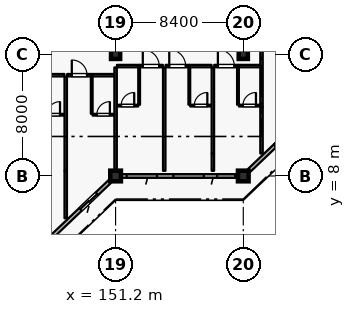
"""IFC4 building model, lengths in metres.
Left out: names, types, materials, properties, quantities, classifications, styles, units other than length and angle.
Written with IfcOpenShell. Run it as: python <this file> out.ifc"""

import sys

from ifc_helpers import new_model, si_unit, direction, frame, frame_2d, origin, origin_2d, place, context, subcontext, project, spatial, rectangle, extrude, element, fill, save


model = new_model("IFC4")
c1 = context("Model", 3, precision=1e-05, world=origin(), true_north=direction((0.0, 1.0)))
c2 = subcontext(c1, "Body", "Model", "MODEL_VIEW")
j1 = project(units=[si_unit("LENGTHUNIT", "METRE"), si_unit("PLANEANGLEUNIT", "RADIAN")], contexts=[c1])
p1 = place(None, origin())
s1 = spatial("IfcSite", under=j1, at=p1, CompositionType="ELEMENT")
p2 = place(p1, origin())
s2 = spatial("IfcBuilding", under=s1, at=p2, CompositionType="ELEMENT")
p3 = place(p2, frame((0.0, 0.0, 36.0)))
s3 = spatial("IfcBuildingStorey", under=s2, at=p3, CompositionType="ELEMENT", Elevation=36.0)
for number, where, z_axis, x_axis in (
    (1, (151.2, 8.0, 0.0), (0.0, 0.0, 1.0), (1.0, 0.0, 0.0)),
    (2, (159.6, 8.0, 0.0), (0.0, 0.0, 1.0), (1.0, 0.0, 0.0)),
):
    element("IfcColumn", number, at=place(p3, frame(where, z_axis=z_axis, x_axis=x_axis)), inside=s3, PredefinedType="COLUMN", context=c2, shape_type="SweptSolid", body=[
        extrude(rectangle(XDim=0.7, YDim=0.7, at=origin_2d()), origin(), (0.0, 0.0, 1.0), 3.6),
    ])
for number, where, z_axis, x_axis in (
    (3, (151.2, 16.0, 0.0), (0.0, 0.0, 1.0), (1.0, 0.0, 0.0)),
    (4, (159.6, 16.0, 0.0), (0.0, 0.0, 1.0), (1.0, 0.0, 0.0)),
):
    element("IfcColumn", number, at=place(p3, frame(where, z_axis=z_axis, x_axis=x_axis)), inside=s3, PredefinedType="COLUMN", context=c2, shape_type="SweptSolid", body=[
        extrude(rectangle(XDim=0.6, YDim=0.6, at=origin_2d()), origin(), (0.0, 0.0, 1.0), 3.6),
    ])
p4 = place(p3, frame((150.85, 7.667, 0.0), z_axis=(0.0, 0.0, 1.0), x_axis=(-0.724116091282, -0.689678103427, 0.0)))
e5 = element("IfcWall", 5, at=p4, inside=s3, PredefinedType="SOLIDWALL", context=c2, shape_type="SweptSolid", body=[
    extrude(rectangle(XDim=10.634, YDim=0.24, at=frame_2d((5.317, 0.0))), origin(), (0.0, 0.0, 1.0), 2.94),
])
p5 = place(p4, frame((1.204, 0.0, 0.0)))
e6 = element("IfcOpeningElement", 6, at=p5, cuts=e5, PredefinedType="OPENING", context=c2, shape_type="SweptSolid", body=[
    extrude(rectangle(XDim=1.5, YDim=2.25, at=frame_2d((0.75, 1.125))), frame((0.0, 0.13, 0.0), z_axis=(0.0, -1.0, 0.0), x_axis=(1.0, 0.0, 0.0)), (0.0, 0.0, 1.0), 0.26),
])
p6 = place(p4, frame((5.511, 0.0, 0.8)))
e7 = element("IfcOpeningElement", 7, at=p6, cuts=e5, PredefinedType="OPENING", context=c2, shape_type="SweptSolid", body=[
    extrude(rectangle(XDim=1.6, YDim=1.6, at=frame_2d((0.8, 0.8))), frame((0.0, 0.13, 0.0), z_axis=(0.0, -1.0, 0.0), x_axis=(1.0, 0.0, 0.0)), (0.0, 0.0, 1.0), 0.26),
])
p7 = place(p4, frame((8.874, 0.0, 0.8)))
e8 = element("IfcOpeningElement", 8, at=p7, cuts=e5, PredefinedType="OPENING", context=c2, shape_type="SweptSolid", body=[
    extrude(rectangle(XDim=1.6, YDim=1.6, at=frame_2d((0.8, 0.8))), frame((0.0, 0.13, 0.0), z_axis=(0.0, -1.0, 0.0), x_axis=(1.0, 0.0, 0.0)), (0.0, 0.0, 1.0), 0.26),
])
p8 = place(p3, frame((159.25, 8.0, 0.0), z_axis=(0.0, 0.0, 1.0), x_axis=(-1.0, 0.0, 0.0)))
e9 = element("IfcWall", 9, at=p8, inside=s3, PredefinedType="SOLIDWALL", context=c2, shape_type="SweptSolid", body=[
    extrude(rectangle(XDim=7.7, YDim=0.24, at=frame_2d((3.85, 0.0))), origin(), (0.0, 0.0, 1.0), 2.94),
])
p9 = place(p8, frame((0.175, 0.0, 0.8)))
e10 = element("IfcOpeningElement", 10, at=p9, cuts=e9, PredefinedType="OPENING", context=c2, shape_type="SweptSolid", body=[
    extrude(rectangle(XDim=1.2, YDim=1.5, at=frame_2d((0.6, 0.75))), frame((0.0, 0.13, 0.0), z_axis=(0.0, -1.0, 0.0), x_axis=(1.0, 0.0, 0.0)), (0.0, 0.0, 1.0), 0.26),
])
p10 = place(p8, frame((2.25, 0.0, 0.8)))
e11 = element("IfcOpeningElement", 11, at=p10, cuts=e9, PredefinedType="OPENING", context=c2, shape_type="SweptSolid", body=[
    extrude(rectangle(XDim=2.0, YDim=1.75, at=frame_2d((1.0, 0.875))), frame((0.0, 0.13, 0.0), z_axis=(0.0, -1.0, 0.0), x_axis=(1.0, 0.0, 0.0)), (0.0, 0.0, 1.0), 0.26),
])
p11 = place(p8, frame((5.325, 0.0, 0.8)))
e12 = element("IfcOpeningElement", 12, at=p11, cuts=e9, PredefinedType="OPENING", context=c2, shape_type="SweptSolid", body=[
    extrude(rectangle(XDim=2.0, YDim=1.75, at=frame_2d((1.0, 0.875))), frame((0.0, 0.13, 0.0), z_axis=(0.0, -1.0, 0.0), x_axis=(1.0, 0.0, 0.0)), (0.0, 0.0, 1.0), 0.26),
])
p12 = place(p3, frame((167.65, 15.667, 0.0), z_axis=(0.0, 0.0, 1.0), x_axis=(-0.724105170588, -0.689689569247, 0.0)))
e13 = element("IfcWall", 13, at=p12, inside=s3, PredefinedType="SOLIDWALL", context=c2, shape_type="SweptSolid", body=[
    extrude(rectangle(XDim=10.634, YDim=0.24, at=frame_2d((5.317, 0.0))), origin(), (0.0, 0.0, 1.0), 2.94),
])
p13 = place(p12, frame((2.081, 0.0, 0.0)))
e14 = element("IfcOpeningElement", 14, at=p13, cuts=e13, PredefinedType="OPENING", context=c2, shape_type="SweptSolid", body=[
    extrude(rectangle(XDim=1.5, YDim=2.25, at=frame_2d((0.75, 1.125))), frame((0.0, 0.13, 0.0), z_axis=(0.0, -1.0, 0.0), x_axis=(1.0, 0.0, 0.0)), (0.0, 0.0, 1.0), 0.26),
])
p14 = place(p12, frame((6.25, 0.0, 0.8)))
e15 = element("IfcOpeningElement", 15, at=p14, cuts=e13, PredefinedType="OPENING", context=c2, shape_type="SweptSolid", body=[
    extrude(rectangle(XDim=2.0, YDim=1.75, at=frame_2d((1.0, 0.875))), frame((0.0, 0.13, 0.0), z_axis=(0.0, -1.0, 0.0), x_axis=(1.0, 0.0, 0.0)), (0.0, 0.0, 1.0), 0.26),
])
p15 = place(p3, frame((146.36, 14.63, 0.0), z_axis=(0.0, 0.0, 1.0), x_axis=(1.0, 0.0, 0.0)))
e16 = element("IfcWall", 16, at=p15, inside=s3, PredefinedType="PARTITIONING", context=c2, shape_type="SweptSolid", body=[
    extrude(rectangle(XDim=1.47, YDim=0.16, at=frame_2d((0.735, 0.0))), origin(), (0.0, 0.0, 1.0), 3.365),
])
p16 = place(p3, frame((146.41, 12.03, 0.0), z_axis=(0.0, 0.0, 1.0), x_axis=(1.0, 0.0, 0.0)))
e17 = element("IfcWall", 17, at=p16, inside=s3, PredefinedType="PARTITIONING", context=c2, shape_type="SweptSolid", body=[
    extrude(rectangle(XDim=1.41, YDim=0.115, at=frame_2d((0.705, 0.0))), origin(), (0.0, 0.0, 1.0), 3.365),
])
p17 = place(p16, frame((0.275, 0.0, 0.0)))
e18 = element("IfcOpeningElement", 18, at=p17, cuts=e17, PredefinedType="OPENING", context=c2, shape_type="SweptSolid", body=[
    extrude(rectangle(XDim=0.86, YDim=2.12, at=frame_2d((0.43, 1.06))), frame((0.0, 0.067, 0.0), z_axis=(0.0, -1.0, 0.0), x_axis=(1.0, 0.0, 0.0)), (0.0, 0.0, 1.0), 0.135),
])
p18 = place(p3, frame((147.92, 5.22, 0.0), z_axis=(0.0, 0.0, 1.0), x_axis=(0.0, 1.0, 0.0)))
e19 = element("IfcWall", 19, at=p18, inside=s3, PredefinedType="PARTITIONING", context=c2, shape_type="SweptSolid", body=[
    extrude(rectangle(XDim=3.11, YDim=0.16, at=frame_2d((1.555, 0.0))), origin(), (0.0, 0.0, 1.0), 3.365),
])
p19 = place(p3, frame((148.01, 14.63, 0.0), z_axis=(0.0, 0.0, 1.0), x_axis=(1.0, 0.0, 0.0)))
e20 = element("IfcWall", 20, at=p19, inside=s3, PredefinedType="PARTITIONING", context=c2, shape_type="SweptSolid", body=[
    extrude(rectangle(XDim=1.62, YDim=0.16, at=frame_2d((0.81, 0.0))), origin(), (0.0, 0.0, 1.0), 3.365),
])
p20 = place(p19, frame((0.31, 0.0, 0.0)))
e21 = element("IfcOpeningElement", 21, at=p20, cuts=e20, PredefinedType="OPENING", context=c2, shape_type="SweptSolid", body=[
    extrude(rectangle(XDim=1.0, YDim=2.25, at=frame_2d((0.5, 1.125))), frame((0.0, 0.09, 0.0), z_axis=(0.0, -1.0, 0.0), x_axis=(1.0, 0.0, 0.0)), (0.0, 0.0, 1.0), 0.18),
])
p21 = place(p3, frame((149.64, 14.63, 0.0), z_axis=(0.0, 0.0, 1.0), x_axis=(1.0, 0.0, 0.0)))
e22 = element("IfcWall", 22, at=p21, inside=s3, PredefinedType="PARTITIONING", context=c2, shape_type="SweptSolid", body=[
    extrude(rectangle(XDim=1.47, YDim=0.16, at=frame_2d((0.735, 0.0))), origin(), (0.0, 0.0, 1.0), 3.365),
])
p22 = place(p3, frame((149.63, 12.09, 0.0), z_axis=(0.0, 0.0, 1.0), x_axis=(0.0, 1.0, 0.0)))
e23 = element("IfcWall", 23, at=p22, inside=s3, PredefinedType="PARTITIONING", context=c2, shape_type="SweptSolid", body=[
    extrude(rectangle(XDim=2.45, YDim=0.115, at=frame_2d((1.225, 0.0))), origin(), (0.0, 0.0, 1.0), 3.365),
])
p23 = place(p3, frame((149.69, 12.03, 0.0), z_axis=(0.0, 0.0, 1.0), x_axis=(1.0, 0.0, 0.0)))
e24 = element("IfcWall", 24, at=p23, inside=s3, PredefinedType="PARTITIONING", context=c2, shape_type="SweptSolid", body=[
    extrude(rectangle(XDim=1.41, YDim=0.115, at=frame_2d((0.705, 0.0))), origin(), (0.0, 0.0, 1.0), 3.365),
])
p24 = place(p23, frame((0.275, 0.0, 0.0)))
e25 = element("IfcOpeningElement", 25, at=p24, cuts=e24, PredefinedType="OPENING", context=c2, shape_type="SweptSolid", body=[
    extrude(rectangle(XDim=0.86, YDim=2.12, at=frame_2d((0.43, 1.06))), frame((0.0, 0.067, 0.0), z_axis=(0.0, -1.0, 0.0), x_axis=(1.0, 0.0, 0.0)), (0.0, 0.0, 1.0), 0.135),
])
p25 = place(p3, frame((147.92, 8.34, 0.0), z_axis=(0.0, 0.0, 1.0), x_axis=(0.0, 1.0, 0.0)))
e26 = element("IfcWall", 26, at=p25, inside=s3, PredefinedType="PARTITIONING", context=c2, shape_type="SweptSolid", body=[
    extrude(rectangle(XDim=6.2, YDim=0.16, at=frame_2d((3.1, 0.0))), origin(), (0.0, 0.0, 1.0), 3.365),
])
p26 = place(p3, frame((151.29, 15.23, 0.0), z_axis=(0.0, 0.0, 1.0), x_axis=(1.0, 0.0, 0.0)))
e27 = element("IfcWall", 27, at=p26, inside=s3, PredefinedType="PARTITIONING", context=c2, shape_type="SweptSolid", body=[
    extrude(rectangle(XDim=1.45, YDim=0.16, at=frame_2d((0.725, 0.0))), origin(), (0.0, 0.0, 1.0), 3.365),
])
p27 = place(p3, frame((152.75, 15.23, 0.0), z_axis=(0.0, 0.0, 1.0), x_axis=(1.0, 0.0, 0.0)))
e28 = element("IfcWall", 28, at=p27, inside=s3, PredefinedType="PARTITIONING", context=c2, shape_type="SweptSolid", body=[
    extrude(rectangle(XDim=1.56, YDim=0.16, at=frame_2d((0.78, 0.0))), origin(), (0.0, 0.0, 1.0), 3.365),
])
p28 = place(p27, frame((0.24, 0.0, 0.0)))
e29 = element("IfcOpeningElement", 29, at=p28, cuts=e28, PredefinedType="OPENING", context=c2, shape_type="SweptSolid", body=[
    extrude(rectangle(XDim=1.08, YDim=2.3, at=frame_2d((0.54, 1.15))), frame((0.0, 0.09, 0.0), z_axis=(0.0, -1.0, 0.0), x_axis=(1.0, 0.0, 0.0)), (0.0, 0.0, 1.0), 0.18),
])
p29 = place(p3, frame((152.75, 12.69, 0.0), z_axis=(0.0, 0.0, 1.0), x_axis=(0.0, 1.0, 0.0)))
e30 = element("IfcWall", 30, at=p29, inside=s3, PredefinedType="PARTITIONING", context=c2, shape_type="SweptSolid", body=[
    extrude(rectangle(XDim=2.45, YDim=0.115, at=frame_2d((1.225, 0.0))), origin(), (0.0, 0.0, 1.0), 3.365),
])
p30 = place(p3, frame((151.3, 12.63, 0.0), z_axis=(0.0, 0.0, 1.0), x_axis=(1.0, 0.0, 0.0)))
e31 = element("IfcWall", 31, at=p30, inside=s3, PredefinedType="PARTITIONING", context=c2, shape_type="SweptSolid", body=[
    extrude(rectangle(XDim=1.39, YDim=0.115, at=frame_2d((0.695, 0.0))), origin(), (0.0, 0.0, 1.0), 3.365),
])
p31 = place(p30, frame((0.265, 0.0, 0.0)))
e32 = element("IfcOpeningElement", 32, at=p31, cuts=e31, PredefinedType="OPENING", context=c2, shape_type="SweptSolid", body=[
    extrude(rectangle(XDim=0.86, YDim=2.12, at=frame_2d((0.43, 1.06))), frame((0.0, 0.067, 0.0), z_axis=(0.0, -1.0, 0.0), x_axis=(1.0, 0.0, 0.0)), (0.0, 0.0, 1.0), 0.135),
])
p32 = place(p3, frame((151.2, 8.34, 0.0), z_axis=(0.0, 0.0, 1.0), x_axis=(0.0, 1.0, 0.0)))
e33 = element("IfcWall", 33, at=p32, inside=s3, PredefinedType="PARTITIONING", context=c2, shape_type="SweptSolid", body=[
    extrude(rectangle(XDim=6.8, YDim=0.16, at=frame_2d((3.4, 0.0))), origin(), (0.0, 0.0, 1.0), 2.74),
])
p33 = place(p3, frame((154.49, 15.23, 0.0), z_axis=(0.0, 0.0, 1.0), x_axis=(1.0, 0.0, 0.0)))
e34 = element("IfcWall", 34, at=p33, inside=s3, PredefinedType="PARTITIONING", context=c2, shape_type="SweptSolid", body=[
    extrude(rectangle(XDim=1.56, YDim=0.16, at=frame_2d((0.78, 0.0))), origin(), (0.0, 0.0, 1.0), 3.365),
])
p34 = place(p33, frame((0.24, 0.0, 0.0)))
e35 = element("IfcOpeningElement", 35, at=p34, cuts=e34, PredefinedType="OPENING", context=c2, shape_type="SweptSolid", body=[
    extrude(rectangle(XDim=1.08, YDim=2.3, at=frame_2d((0.54, 1.15))), frame((0.0, 0.09, 0.0), z_axis=(0.0, -1.0, 0.0), x_axis=(1.0, 0.0, 0.0)), (0.0, 0.0, 1.0), 0.18),
])
p35 = place(p3, frame((156.06, 15.23, 0.0), z_axis=(0.0, 0.0, 1.0), x_axis=(1.0, 0.0, 0.0)))
e36 = element("IfcWall", 36, at=p35, inside=s3, PredefinedType="PARTITIONING", context=c2, shape_type="SweptSolid", body=[
    extrude(rectangle(XDim=1.45, YDim=0.16, at=frame_2d((0.725, 0.0))), origin(), (0.0, 0.0, 1.0), 3.365),
])
p36 = place(p3, frame((156.05, 12.69, 0.0), z_axis=(0.0, 0.0, 1.0), x_axis=(0.0, 1.0, 0.0)))
e37 = element("IfcWall", 37, at=p36, inside=s3, PredefinedType="PARTITIONING", context=c2, shape_type="SweptSolid", body=[
    extrude(rectangle(XDim=2.45, YDim=0.115, at=frame_2d((1.225, 0.0))), origin(), (0.0, 0.0, 1.0), 3.365),
])
p37 = place(p3, frame((156.11, 12.63, 0.0), z_axis=(0.0, 0.0, 1.0), x_axis=(1.0, 0.0, 0.0)))
e38 = element("IfcWall", 38, at=p37, inside=s3, PredefinedType="PARTITIONING", context=c2, shape_type="SweptSolid", body=[
    extrude(rectangle(XDim=1.39, YDim=0.115, at=frame_2d((0.695, 0.0))), origin(), (0.0, 0.0, 1.0), 3.365),
])
p38 = place(p37, frame((0.265, 0.0, 0.0)))
e39 = element("IfcOpeningElement", 39, at=p38, cuts=e38, PredefinedType="OPENING", context=c2, shape_type="SweptSolid", body=[
    extrude(rectangle(XDim=0.86, YDim=2.12, at=frame_2d((0.43, 1.06))), frame((0.0, 0.067, 0.0), z_axis=(0.0, -1.0, 0.0), x_axis=(1.0, 0.0, 0.0)), (0.0, 0.0, 1.0), 0.135),
])
p39 = place(p3, frame((154.4, 8.34, 0.0), z_axis=(0.0, 0.0, 1.0), x_axis=(0.0, 1.0, 0.0)))
e40 = element("IfcWall", 40, at=p39, inside=s3, PredefinedType="PARTITIONING", context=c2, shape_type="SweptSolid", body=[
    extrude(rectangle(XDim=6.8, YDim=0.16, at=frame_2d((3.4, 0.0))), origin(), (0.0, 0.0, 1.0), 3.365),
])
p40 = place(p3, frame((157.6, 8.34, 0.0), z_axis=(0.0, 0.0, 1.0), x_axis=(0.0, 1.0, 0.0)))
e41 = element("IfcWall", 41, at=p40, inside=s3, PredefinedType="PARTITIONING", context=c2, shape_type="SweptSolid", body=[
    extrude(rectangle(XDim=1.13, YDim=0.16, at=frame_2d((0.565, 0.0))), origin(), (0.0, 0.0, 1.0), 3.365),
])
p41 = place(p3, frame((157.69, 15.23, 0.0), z_axis=(0.0, 0.0, 1.0), x_axis=(1.0, 0.0, 0.0)))
e42 = element("IfcWall", 42, at=p41, inside=s3, PredefinedType="PARTITIONING", context=c2, shape_type="SweptSolid", body=[
    extrude(rectangle(XDim=1.56, YDim=0.16, at=frame_2d((0.78, 0.0))), origin(), (0.0, 0.0, 1.0), 3.365),
])
p42 = place(p41, frame((0.24, 0.0, 0.0)))
e43 = element("IfcOpeningElement", 43, at=p42, cuts=e42, PredefinedType="OPENING", context=c2, shape_type="SweptSolid", body=[
    extrude(rectangle(XDim=1.08, YDim=2.3, at=frame_2d((0.54, 1.15))), frame((0.0, 0.09, 0.0), z_axis=(0.0, -1.0, 0.0), x_axis=(1.0, 0.0, 0.0)), (0.0, 0.0, 1.0), 0.18),
])
p43 = place(p3, frame((159.26, 15.23, 0.0), z_axis=(0.0, 0.0, 1.0), x_axis=(1.0, 0.0, 0.0)))
e44 = element("IfcWall", 44, at=p43, inside=s3, PredefinedType="PARTITIONING", context=c2, shape_type="SweptSolid", body=[
    extrude(rectangle(XDim=1.45, YDim=0.16, at=frame_2d((0.725, 0.0))), origin(), (0.0, 0.0, 1.0), 3.365),
])
p44 = place(p3, frame((159.25, 12.69, 0.0), z_axis=(0.0, 0.0, 1.0), x_axis=(0.0, 1.0, 0.0)))
e45 = element("IfcWall", 45, at=p44, inside=s3, PredefinedType="PARTITIONING", context=c2, shape_type="SweptSolid", body=[
    extrude(rectangle(XDim=2.45, YDim=0.115, at=frame_2d((1.225, 0.0))), origin(), (0.0, 0.0, 1.0), 3.365),
])
p45 = place(p3, frame((159.31, 12.63, 0.0), z_axis=(0.0, 0.0, 1.0), x_axis=(1.0, 0.0, 0.0)))
e46 = element("IfcWall", 46, at=p45, inside=s3, PredefinedType="PARTITIONING", context=c2, shape_type="SweptSolid", body=[
    extrude(rectangle(XDim=1.39, YDim=0.115, at=frame_2d((0.695, 0.0))), origin(), (0.0, 0.0, 1.0), 3.365),
])
p46 = place(p45, frame((0.265, 0.0, 0.0)))
e47 = element("IfcOpeningElement", 47, at=p46, cuts=e46, PredefinedType="OPENING", context=c2, shape_type="SweptSolid", body=[
    extrude(rectangle(XDim=0.86, YDim=2.12, at=frame_2d((0.43, 1.06))), frame((0.0, 0.067, 0.0), z_axis=(0.0, -1.0, 0.0), x_axis=(1.0, 0.0, 0.0)), (0.0, 0.0, 1.0), 0.135),
])
p47 = place(p3, frame((157.6, 9.48, 0.0), z_axis=(0.0, 0.0, 1.0), x_axis=(0.0, 1.0, 0.0)))
e48 = element("IfcWall", 48, at=p47, inside=s3, PredefinedType="PARTITIONING", context=c2, shape_type="SweptSolid", body=[
    extrude(rectangle(XDim=5.66, YDim=0.16, at=frame_2d((2.83, 0.0))), origin(), (0.0, 0.0, 1.0), 3.365),
])
p48 = place(p3, frame((160.8, 9.48, 0.0), z_axis=(0.0, 0.0, 1.0), x_axis=(0.0, 1.0, 0.0)))
e49 = element("IfcWall", 49, at=p48, inside=s3, PredefinedType="PARTITIONING", context=c2, shape_type="SweptSolid", body=[
    extrude(rectangle(XDim=3.04, YDim=0.16, at=frame_2d((1.52, 0.0))), origin(), (0.0, 0.0, 1.0), 3.365),
])
p49 = place(p3, frame((160.8, 12.53, 0.0), z_axis=(0.0, 0.0, 1.0), x_axis=(0.0, 1.0, 0.0)))
e50 = element("IfcWall", 50, at=p49, inside=s3, PredefinedType="PARTITIONING", context=c2, shape_type="SweptSolid", body=[
    extrude(rectangle(XDim=9.55, YDim=0.16, at=frame_2d((4.775, 0.0))), origin(), (0.0, 0.0, 1.0), 3.365),
])
p50 = place(p5, origin())
e51 = element("IfcDoor", 51, at=p50, inside=s3, OperationType="SLIDING_TO_LEFT", PredefinedType="DOOR", context=c2, shape_type="SweptSolid", body=[
    extrude(rectangle(XDim=1.5, YDim=2.25, at=frame_2d((0.75, 1.125))), frame((0.0, 0.025, 0.0), z_axis=(0.0, -1.0, 0.0), x_axis=(1.0, 0.0, 0.0)), (0.0, 0.0, 1.0), 0.05),
])
fill(e6, e51)
p51 = place(p9, origin())
e52 = element("IfcWindow", 52, at=p51, inside=s3, PartitioningType="SINGLE_PANEL", PredefinedType="WINDOW", context=c2, shape_type="SweptSolid", body=[
    extrude(rectangle(XDim=1.2, YDim=1.5, at=frame_2d((0.6, 0.75))), frame((0.0, 0.03, 0.0), z_axis=(0.0, -1.0, 0.0), x_axis=(1.0, 0.0, 0.0)), (0.0, 0.0, 1.0), 0.06),
])
fill(e10, e52)
p52 = place(p10, origin())
e53 = element("IfcWindow", 53, at=p52, inside=s3, PartitioningType="DOUBLE_PANEL_VERTICAL", PredefinedType="WINDOW", context=c2, shape_type="SweptSolid", body=[
    extrude(rectangle(XDim=2.0, YDim=1.75, at=frame_2d((1.0, 0.875))), frame((0.0, 0.03, 0.0), z_axis=(0.0, -1.0, 0.0), x_axis=(1.0, 0.0, 0.0)), (0.0, 0.0, 1.0), 0.06),
])
fill(e11, e53)
p53 = place(p11, origin())
e54 = element("IfcWindow", 54, at=p53, inside=s3, PartitioningType="DOUBLE_PANEL_VERTICAL", PredefinedType="WINDOW", context=c2, shape_type="SweptSolid", body=[
    extrude(rectangle(XDim=2.0, YDim=1.75, at=frame_2d((1.0, 0.875))), frame((0.0, 0.03, 0.0), z_axis=(0.0, -1.0, 0.0), x_axis=(1.0, 0.0, 0.0)), (0.0, 0.0, 1.0), 0.06),
])
fill(e12, e54)
p54 = place(p14, origin())
e55 = element("IfcWindow", 55, at=p54, inside=s3, PartitioningType="DOUBLE_PANEL_VERTICAL", PredefinedType="WINDOW", context=c2, shape_type="SweptSolid", body=[
    extrude(rectangle(XDim=2.0, YDim=1.75, at=frame_2d((1.0, 0.875))), frame((0.0, 0.03, 0.0), z_axis=(0.0, -1.0, 0.0), x_axis=(1.0, 0.0, 0.0)), (0.0, 0.0, 1.0), 0.06),
])
fill(e15, e55)
p55 = place(p17, origin())
e56 = element("IfcDoor", 56, at=p55, inside=s3, OperationType="SINGLE_SWING_RIGHT", PredefinedType="DOOR", context=c2, shape_type="SweptSolid", body=[
    extrude(rectangle(XDim=0.86, YDim=2.12, at=frame_2d((0.43, 1.06))), frame((0.0, 0.025, 0.0), z_axis=(0.0, -1.0, 0.0), x_axis=(1.0, 0.0, 0.0)), (0.0, 0.0, 1.0), 0.05),
])
fill(e18, e56)
p56 = place(p20, origin())
e57 = element("IfcDoor", 57, at=p56, inside=s3, OperationType="SINGLE_SWING_LEFT", PredefinedType="DOOR", context=c2, shape_type="SweptSolid", body=[
    extrude(rectangle(XDim=1.0, YDim=2.25, at=frame_2d((0.5, 1.125))), frame((0.0, 0.025, 0.0), z_axis=(0.0, -1.0, 0.0), x_axis=(1.0, 0.0, 0.0)), (0.0, 0.0, 1.0), 0.05),
])
fill(e21, e57)
p57 = place(p24, origin())
e58 = element("IfcDoor", 58, at=p57, inside=s3, OperationType="SINGLE_SWING_RIGHT", PredefinedType="DOOR", context=c2, shape_type="SweptSolid", body=[
    extrude(rectangle(XDim=0.86, YDim=2.12, at=frame_2d((0.43, 1.06))), frame((0.0, 0.025, 0.0), z_axis=(0.0, -1.0, 0.0), x_axis=(1.0, 0.0, 0.0)), (0.0, 0.0, 1.0), 0.05),
])
fill(e25, e58)
p58 = place(p28, origin())
e59 = element("IfcDoor", 59, at=p58, inside=s3, OperationType="SINGLE_SWING_LEFT", PredefinedType="DOOR", context=c2, shape_type="SweptSolid", body=[
    extrude(rectangle(XDim=1.08, YDim=2.3, at=frame_2d((0.54, 1.15))), frame((0.0, 0.025, 0.0), z_axis=(0.0, -1.0, 0.0), x_axis=(1.0, 0.0, 0.0)), (0.0, 0.0, 1.0), 0.05),
])
fill(e29, e59)
p59 = place(p31, origin())
e60 = element("IfcDoor", 60, at=p59, inside=s3, OperationType="SINGLE_SWING_RIGHT", PredefinedType="DOOR", context=c2, shape_type="SweptSolid", body=[
    extrude(rectangle(XDim=0.86, YDim=2.12, at=frame_2d((0.43, 1.06))), frame((0.0, 0.025, 0.0), z_axis=(0.0, -1.0, 0.0), x_axis=(1.0, 0.0, 0.0)), (0.0, 0.0, 1.0), 0.05),
])
fill(e32, e60)
p60 = place(p34, origin())
e61 = element("IfcDoor", 61, at=p60, inside=s3, OperationType="SINGLE_SWING_LEFT", PredefinedType="DOOR", context=c2, shape_type="SweptSolid", body=[
    extrude(rectangle(XDim=1.08, YDim=2.3, at=frame_2d((0.54, 1.15))), frame((0.0, 0.025, 0.0), z_axis=(0.0, -1.0, 0.0), x_axis=(1.0, 0.0, 0.0)), (0.0, 0.0, 1.0), 0.05),
])
fill(e35, e61)
p61 = place(p38, origin())
e62 = element("IfcDoor", 62, at=p61, inside=s3, OperationType="SINGLE_SWING_RIGHT", PredefinedType="DOOR", context=c2, shape_type="SweptSolid", body=[
    extrude(rectangle(XDim=0.86, YDim=2.12, at=frame_2d((0.43, 1.06))), frame((0.0, 0.025, 0.0), z_axis=(0.0, -1.0, 0.0), x_axis=(1.0, 0.0, 0.0)), (0.0, 0.0, 1.0), 0.05),
])
fill(e39, e62)
p62 = place(p42, origin())
e63 = element("IfcDoor", 63, at=p62, inside=s3, OperationType="SINGLE_SWING_LEFT", PredefinedType="DOOR", context=c2, shape_type="SweptSolid", body=[
    extrude(rectangle(XDim=1.08, YDim=2.3, at=frame_2d((0.54, 1.15))), frame((0.0, 0.025, 0.0), z_axis=(0.0, -1.0, 0.0), x_axis=(1.0, 0.0, 0.0)), (0.0, 0.0, 1.0), 0.05),
])
fill(e43, e63)
p63 = place(p46, origin())
e64 = element("IfcDoor", 64, at=p63, inside=s3, OperationType="SINGLE_SWING_RIGHT", PredefinedType="DOOR", context=c2, shape_type="SweptSolid", body=[
    extrude(rectangle(XDim=0.86, YDim=2.12, at=frame_2d((0.43, 1.06))), frame((0.0, 0.025, 0.0), z_axis=(0.0, -1.0, 0.0), x_axis=(1.0, 0.0, 0.0)), (0.0, 0.0, 1.0), 0.05),
])
fill(e47, e64)
save(model, sys.argv[1])
